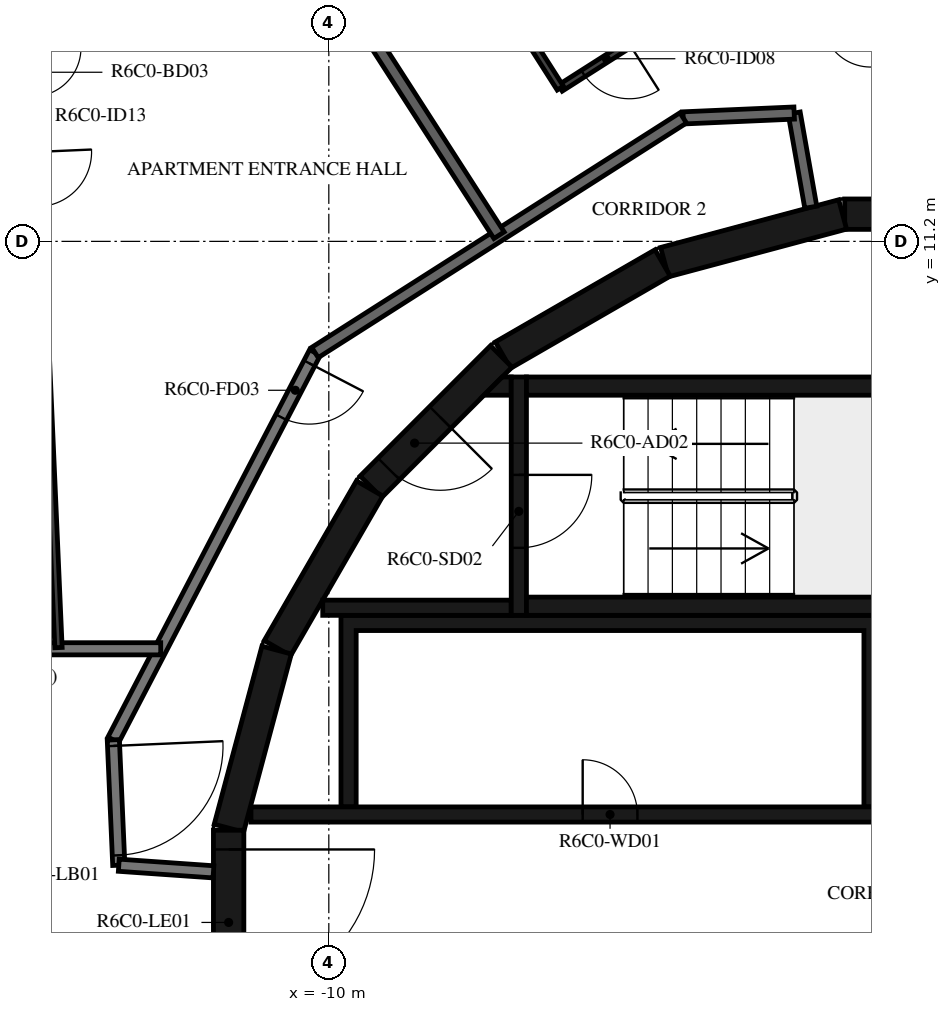
"""IFC4 building model, lengths in metres.
Left out: names, types, materials, properties, quantities, classifications, styles, units other than length and angle.
Written with IfcOpenShell. Run it as: python <this file> out.ifc"""

import sys

from ifc_helpers import new_model, si_unit, direction, frame, frame_2d, origin, place, context, subcontext, project, spatial, polyline, rectangle, outline, extrude, element, fill, save


model = new_model("IFC4")
c1 = context("Model", 3, precision=1e-05, world=origin(), true_north=direction((0.0, 1.0)))
c2 = subcontext(c1, "Body", "Model", "MODEL_VIEW")
j1 = project(units=[si_unit("LENGTHUNIT", "METRE"), si_unit("PLANEANGLEUNIT", "RADIAN")], contexts=[c1])
p1 = place(None, origin())
s1 = spatial("IfcSite", under=j1, at=p1, CompositionType="ELEMENT")
p2 = place(p1, origin())
s2 = spatial("IfcBuilding", under=s1, at=p2, CompositionType="ELEMENT")
p3 = place(p2, frame((0.0, 0.0, 247.7)))
s3 = spatial("IfcBuildingStorey", under=s2, at=p3, CompositionType="ELEMENT", Elevation=247.7)
for number, where, z_axis, x_axis in (
    (1, (1.516, 11.647, 0.0), (0.0, 0.0, 1.0), (-1.0, 0.0, 0.0)),
    (2, (-1.55, 11.643, 0.0), (0.0, 0.0, 1.0), (-0.966, -0.259, 0.0)),
    (3, (-4.51, 10.845, 0.0), (0.0, 0.0, 1.0), (-0.866, -0.5, 0.0)),
):
    element("IfcWall", number, at=place(p3, frame(where, z_axis=z_axis, x_axis=x_axis)), inside=s3, PredefinedType="SHEAR", context=c2, shape_type="SweptSolid", body=[
        extrude(rectangle(XDim=3.033, YDim=0.5, at=frame_2d((1.516, 0.0))), origin(), (0.0, 0.0, 1.0), 3.12),
    ])
p4 = place(p3, frame((-7.164, 9.308, 0.0), z_axis=(0.0, 0.0, 1.0), x_axis=(-0.707106781187, -0.707106781187, 0.0)))
e4 = element("IfcWall", 4, at=p4, inside=s3, PredefinedType="SHEAR", context=c2, shape_type="SweptSolid", body=[
    extrude(rectangle(XDim=3.032, YDim=0.5, at=frame_2d((1.516, 0.0))), origin(), (0.0, 0.0, 1.0), 3.12),
])
p5 = place(p4, frame((1.416, 0.0, 0.0)))
e5 = element("IfcOpeningElement", 5, at=p5, cuts=e4, PredefinedType="OPENING", context=c2, shape_type="SweptSolid", body=[
    extrude(rectangle(XDim=1.2, YDim=2.1, at=frame_2d((0.6, 1.05))), frame((0.0, 0.26, 0.0), z_axis=(0.0, -1.0, 0.0), x_axis=(1.0, 0.0, 0.0)), (0.0, 0.0, 1.0), 0.52),
])
for number, where, z_axis, x_axis in (
    (6, (-9.329, 7.137, 0.0), (0.0, 0.0, 1.0), (-0.5, -0.866, 0.0)),
    (7, (-10.858, 4.479, 0.0), (0.0, 0.0, 1.0), (-0.259, -0.966, 0.0)),
):
    element("IfcWall", number, at=place(p3, frame(where, z_axis=z_axis, x_axis=x_axis)), inside=s3, PredefinedType="SHEAR", context=c2, shape_type="SweptSolid", body=[
        extrude(rectangle(XDim=3.033, YDim=0.5, at=frame_2d((1.516, 0.0))), origin(), (0.0, 0.0, 1.0), 3.12),
    ])
p6 = place(p3, frame((-11.647, 1.516, 0.0), z_axis=(0.0, 0.0, 1.0), x_axis=(0.0, -1.0, 0.0)))
e8 = element("IfcWall", 8, at=p6, inside=s3, PredefinedType="SHEAR", context=c2, shape_type="SweptSolid", body=[
    extrude(rectangle(XDim=3.033, YDim=0.5, at=frame_2d((1.516, 0.0))), origin(), (0.0, 0.0, 1.0), 3.12),
])
p7 = place(p6, frame((0.316, 0.0, 0.0)))
e9 = element("IfcOpeningElement", 9, at=p7, cuts=e8, PredefinedType="OPENING", context=c2, shape_type="SweptSolid", body=[
    extrude(rectangle(XDim=2.4, YDim=2.1, at=frame_2d((1.2, 1.05))), frame((0.0, 0.26, 0.0), z_axis=(0.0, -1.0, 0.0), x_axis=(1.0, 0.0, 0.0)), (0.0, 0.0, 1.0), 0.52),
])
for number, where, z_axis, x_axis in (
    (10, (-6.75, 5.2, 0.0), (0.0, 0.0, 1.0), (1.0, 0.0, 0.0)),
    (11, (-6.75, 8.82, 0.0), (0.0, 0.0, 1.0), (1.0, 0.0, 0.0)),
):
    element("IfcWall", number, at=place(p3, frame(where, z_axis=z_axis, x_axis=x_axis)), inside=s3, PredefinedType="SHEAR", context=c2, shape_type="SweptSolid", body=[
        extrude(rectangle(XDim=6.75, YDim=0.3, at=frame_2d((3.375, 0.0))), origin(), (0.0, 0.0, 1.0), 3.12),
    ])
p8 = place(p3, frame((-6.875, 8.97, 0.0), z_axis=(0.0, 0.0, 1.0), x_axis=(0.0, -1.0, 0.0)))
e12 = element("IfcWall", 12, at=p8, inside=s3, PredefinedType="SHEAR", context=c2, shape_type="SweptSolid", body=[
    extrude(rectangle(XDim=3.92, YDim=0.25, at=frame_2d((1.96, 0.0))), origin(), (0.0, 0.0, 1.0), 3.12),
])
p9 = place(p8, frame((1.61, 0.0, 0.0)))
e13 = element("IfcOpeningElement", 13, at=p9, cuts=e12, PredefinedType="OPENING", context=c2, shape_type="SweptSolid", body=[
    extrude(rectangle(XDim=1.2, YDim=2.1, at=frame_2d((0.6, 1.05))), frame((0.0, 0.135, 0.0), z_axis=(0.0, -1.0, 0.0), x_axis=(1.0, 0.0, 0.0)), (0.0, 0.0, 1.0), 0.27),
])
p10 = place(p3, frame((-7.0, 5.175, 0.0), z_axis=(0.0, 0.0, 1.0), x_axis=(-1.0, 0.0, 0.0)))
e14 = element("IfcWall", 14, at=p10, inside=s3, PredefinedType="SHEAR", context=c2, shape_type="SweptSolid", body=[
    extrude(rectangle(XDim=3.1, YDim=0.25, at=frame_2d((1.55, 0.0))), origin(), (0.0, 0.0, 1.0), 3.12),
])
p11 = place(p3, origin())
e15 = element("IfcWall", 15, at=p11, inside=s3, PredefinedType="SHEAR", context=c2, shape_type="SweptSolid", body=[
    extrude(outline(polyline([(-7.148, 8.97), (-7.0, 8.97), (-7.0, 8.67), (-7.448, 8.67), (-7.148, 8.97)])), origin(), (0.0, 0.0, 1.0), 3.12),
])
p12 = place(p3, origin())
e16 = element("IfcWall", 16, at=p12, inside=s3, PredefinedType="SHEAR", context=c2, shape_type="SweptSolid", body=[
    extrude(outline(polyline([(-9.55, 4.8), (-1.2, 4.8), (-1.2, 1.9), (-0.95, 1.9), (-0.95, 4.8), (0.95, 4.8), (0.95, 1.9), (1.2, 1.9), (1.2, 4.8), (3.1, 4.8), (3.1, 1.9), (3.35, 1.9), (3.35, 4.8), (5.25, 4.8), (5.25, 1.9), (5.5, 1.9), (5.5, 4.8), (7.4, 4.8), (7.4, 1.9), (7.65, 1.9), (7.65, 4.8), (9.55, 4.8), (9.55, 1.9), (9.8, 1.9), (9.8, 4.8), (9.8, 5.05), (-9.8, 5.05), (-9.8, 4.8), (-9.8, 1.9), (-9.55, 1.9), (-9.55, 4.8)])), origin(), (0.0, 0.0, 1.0), 3.12),
])
p13 = place(p3, frame((-11.28, 1.775, 0.0), z_axis=(0.0, 0.0, 1.0), x_axis=(1.0, 0.0, 0.0)))
e17 = element("IfcWall", 17, at=p13, inside=s3, PredefinedType="SHEAR", context=c2, shape_type="SweptSolid", body=[
    extrude(rectangle(XDim=14.38, YDim=0.25, at=frame_2d((7.19, 0.0))), origin(), (0.0, 0.0, 1.0), 3.12),
])
p14 = place(p13, frame((10.73, 0.0, 0.0)))
e18 = element("IfcOpeningElement", 18, at=p14, cuts=e17, PredefinedType="OPENING", context=c2, shape_type="SweptSolid", body=[
    extrude(rectangle(XDim=1.1, YDim=2.1, at=frame_2d((0.55, 1.05))), frame((0.0, 0.135, 0.0), z_axis=(0.0, -1.0, 0.0), x_axis=(1.0, 0.0, 0.0)), (0.0, 0.0, 1.0), 0.27),
])
p15 = place(p13, frame((12.88, 0.0, 0.0)))
e19 = element("IfcOpeningElement", 19, at=p15, cuts=e17, PredefinedType="OPENING", context=c2, shape_type="SweptSolid", body=[
    extrude(rectangle(XDim=1.1, YDim=2.1, at=frame_2d((0.55, 1.05))), frame((0.0, 0.135, 0.0), z_axis=(0.0, -1.0, 0.0), x_axis=(1.0, 0.0, 0.0)), (0.0, 0.0, 1.0), 0.27),
])
p16 = place(p13, frame((5.455, 0.0, 0.0)))
e20 = element("IfcOpeningElement", 20, at=p16, cuts=e17, PredefinedType="OPENING", context=c2, shape_type="SweptSolid", body=[
    extrude(rectangle(XDim=0.9, YDim=2.1, at=frame_2d((0.45, 1.05))), frame((0.0, 0.135, 0.0), z_axis=(0.0, -1.0, 0.0), x_axis=(1.0, 0.0, 0.0)), (0.0, 0.0, 1.0), 0.27),
])
p17 = place(p3, frame((-10.228, 9.372, 0.0), z_axis=(0.0, 0.0, 1.0), x_axis=(-0.461759464021, -0.887005184532, 0.0)))
e21 = element("IfcWall", 21, at=p17, inside=s3, PredefinedType="STANDARD", context=c2, shape_type="SweptSolid", body=[
    extrude(rectangle(XDim=7.181, YDim=0.2, at=frame_2d((3.591, 0.0))), origin(), (0.0, 0.0, 1.0), 3.12),
])
p18 = place(p17, frame((0.2, 0.0, 0.0)))
e22 = element("IfcOpeningElement", 22, at=p18, cuts=e21, PredefinedType="OPENING", context=c2, shape_type="SweptSolid", body=[
    extrude(rectangle(XDim=1.0, YDim=2.1, at=frame_2d((0.5, 1.05))), frame((0.0, 0.11, 0.0), z_axis=(0.0, -1.0, 0.0), x_axis=(1.0, 0.0, 0.0)), (0.0, 0.0, 1.0), 0.22),
])
p19 = place(p3, frame((-13.544, 3.003, 0.0), z_axis=(0.0, 0.0, 1.0), x_axis=(0.043652842459, -0.99904676034, 0.0)))
e23 = element("IfcWall", 23, at=p19, inside=s3, PredefinedType="STANDARD", context=c2, shape_type="SweptSolid", body=[
    extrude(rectangle(XDim=2.064, YDim=0.2, at=frame_2d((1.032, 0.0))), origin(), (0.0, 0.0, 1.0), 3.12),
])
p20 = place(p19, frame((0.1, 0.0, 0.0)))
e24 = element("IfcOpeningElement", 24, at=p20, cuts=e23, PredefinedType="OPENING", context=c2, shape_type="SweptSolid", body=[
    extrude(rectangle(XDim=1.8, YDim=2.1, at=frame_2d((0.9, 1.05))), frame((0.0, 0.11, 0.0), z_axis=(0.0, -1.0, 0.0), x_axis=(1.0, 0.0, 0.0)), (0.0, 0.0, 1.0), 0.22),
])
p21 = place(p3, frame((-13.454, 0.941, 0.0), z_axis=(0.0, 0.0, 1.0), x_axis=(0.99755155062, -0.069934997354, 0.0)))
e25 = element("IfcWall", 25, at=p21, inside=s3, PredefinedType="STANDARD", context=c2, shape_type="SweptSolid", body=[
    extrude(rectangle(XDim=1.561, YDim=0.2, at=frame_2d((0.78, 0.0))), origin(), (0.0, 0.0, 1.0), 3.12),
])
p22 = place(p3, frame((-2.074, 11.761, 0.0), z_axis=(0.0, 0.0, 1.0), x_axis=(-0.173679082312, 0.984802303189, 0.0)))
e26 = element("IfcWall", 26, at=p22, inside=s3, PredefinedType="STANDARD", context=c2, shape_type="SweptSolid", body=[
    extrude(rectangle(XDim=1.573, YDim=0.2, at=frame_2d((0.787, 0.0))), origin(), (0.0, 0.0, 1.0), 3.12),
])
p23 = place(p3, frame((-2.347, 13.31, 0.0), z_axis=(0.0, 0.0, 1.0), x_axis=(-0.999050095671, -0.043576442492, 0.0)))
e27 = element("IfcWall", 27, at=p23, inside=s3, PredefinedType="STANDARD", context=c2, shape_type="SweptSolid", body=[
    extrude(rectangle(XDim=1.826, YDim=0.2, at=frame_2d((0.913, 0.0))), origin(), (0.0, 0.0, 1.0), 3.12),
])
p24 = place(p3, frame((-4.172, 13.231, 0.0), z_axis=(0.0, 0.0, 1.0), x_axis=(-0.843388394728, -0.537304397561, 0.0)))
e28 = element("IfcWall", 28, at=p24, inside=s3, PredefinedType="STANDARD", context=c2, shape_type="SweptSolid", body=[
    extrude(rectangle(XDim=7.181, YDim=0.2, at=frame_2d((3.59, 0.0))), origin(), (0.0, 0.0, 1.0), 3.12),
])
p25 = place(p3, frame((-12.764, 4.5, 0.0), z_axis=(0.0, 0.0, 1.0), x_axis=(-1.0, 0.0, 0.0)))
e29 = element("IfcWall", 29, at=p25, inside=s3, PredefinedType="STANDARD", context=c2, shape_type="SweptSolid", body=[
    extrude(rectangle(XDim=5.135, YDim=0.2, at=frame_2d((2.568, 0.0))), origin(), (0.0, 0.0, 1.0), 3.12),
])
p26 = place(p3, frame((-9.69, 15.171, 0.0), z_axis=(0.0, 0.0, 1.0), x_axis=(0.540961372678, -0.841047438181, 0.0)))
e30 = element("IfcWall", 30, at=p26, inside=s3, PredefinedType="STANDARD", context=c2, shape_type="SweptSolid", body=[
    extrude(rectangle(XDim=4.602, YDim=0.2, at=frame_2d((2.301, 0.0))), origin(), (0.0, 0.0, 1.0), 3.12),
])
p27 = place(p3, frame((-4.888, 14.553, 0.0), z_axis=(0.0, 0.0, 1.0), x_axis=(-0.843349608892, -0.537365273517, 0.0)))
e31 = element("IfcWall", 31, at=p27, inside=s3, PredefinedType="PARTITIONING", context=c2, shape_type="SweptSolid", body=[
    extrude(rectangle(XDim=1.548, YDim=0.12, at=frame_2d((0.774, 0.0))), origin(), (0.0, 0.0, 1.0), 3.12),
])
p28 = place(p27, frame((0.2, 0.0, 0.0)))
e32 = element("IfcOpeningElement", 32, at=p28, cuts=e31, PredefinedType="OPENING", context=c2, shape_type="SweptSolid", body=[
    extrude(rectangle(XDim=0.9, YDim=2.1, at=frame_2d((0.45, 1.05))), frame((0.0, 0.07, 0.0), z_axis=(0.0, -1.0, 0.0), x_axis=(1.0, 0.0, 0.0)), (0.0, 0.0, 1.0), 0.14),
])
p29 = place(p3, frame((-6.194, 13.721, 0.0), z_axis=(0.0, 0.0, 1.0), x_axis=(-0.537316807294, 0.843380488629, 0.0)))
e33 = element("IfcWall", 33, at=p29, inside=s3, PredefinedType="PARTITIONING", context=c2, shape_type="SweptSolid", body=[
    extrude(rectangle(XDim=4.331, YDim=0.12, at=frame_2d((2.165, 0.0))), origin(), (0.0, 0.0, 1.0), 3.12),
])
p30 = place(p3, frame((-14.955, 16.187, 0.0), z_axis=(0.0, 0.0, 1.0), x_axis=(0.04360777668, -0.999048728448, 0.0)))
e34 = element("IfcWall", 34, at=p30, inside=s3, PredefinedType="PARTITIONING", context=c2, shape_type="SweptSolid", body=[
    extrude(rectangle(XDim=11.679, YDim=0.12, at=frame_2d((5.839, 0.0))), origin(), (0.0, 0.0, 1.0), 3.12),
])
p31 = place(p30, frame((1.808, 0.0, 0.0)))
e35 = element("IfcOpeningElement", 35, at=p31, cuts=e34, PredefinedType="OPENING", context=c2, shape_type="SweptSolid", body=[
    extrude(rectangle(XDim=0.8, YDim=2.1, at=frame_2d((0.4, 1.05))), frame((0.0, 0.07, 0.0), z_axis=(0.0, -1.0, 0.0), x_axis=(1.0, 0.0, 0.0)), (0.0, 0.0, 1.0), 0.14),
])
p32 = place(p30, frame((3.519, 0.0, 0.0)))
e36 = element("IfcOpeningElement", 36, at=p32, cuts=e34, PredefinedType="OPENING", context=c2, shape_type="SweptSolid", body=[
    extrude(rectangle(XDim=0.9, YDim=2.1, at=frame_2d((0.45, 1.05))), frame((0.0, 0.07, 0.0), z_axis=(0.0, -1.0, 0.0), x_axis=(1.0, 0.0, 0.0)), (0.0, 0.0, 1.0), 0.14),
])
p33 = place(p9, origin())
e37 = element("IfcDoor", 37, at=p33, inside=s3, OperationType="SINGLE_SWING_LEFT", PredefinedType="DOOR", context=c2, shape_type="SweptSolid", body=[
    extrude(rectangle(XDim=1.2, YDim=2.1, at=frame_2d((0.6, 1.05))), frame((0.0, 0.025, 0.0), z_axis=(0.0, -1.0, 0.0), x_axis=(1.0, 0.0, 0.0)), (0.0, 0.0, 1.0), 0.05),
])
fill(e13, e37)
p34 = place(p5, origin())
e38 = element("IfcDoor", 38, at=p34, inside=s3, OperationType="SINGLE_SWING_RIGHT", PredefinedType="DOOR", context=c2, shape_type="SweptSolid", body=[
    extrude(rectangle(XDim=1.2, YDim=2.1, at=frame_2d((0.6, 1.05))), frame((0.0, 0.025, 0.0), z_axis=(0.0, -1.0, 0.0), x_axis=(1.0, 0.0, 0.0)), (0.0, 0.0, 1.0), 0.05),
])
fill(e5, e38)
p35 = place(p7, origin())
e39 = element("IfcDoor", 39, at=p35, inside=s3, OperationType="DOUBLE_DOOR_SINGLE_SWING", PredefinedType="DOOR", context=c2, shape_type="SweptSolid", body=[
    extrude(rectangle(XDim=2.4, YDim=2.1, at=frame_2d((1.2, 1.05))), frame((0.0, 0.025, 0.0), z_axis=(0.0, -1.0, 0.0), x_axis=(1.0, 0.0, 0.0)), (0.0, 0.0, 1.0), 0.05),
])
fill(e9, e39)
p36 = place(p16, origin())
e40 = element("IfcDoor", 40, at=p36, inside=s3, OperationType="SINGLE_SWING_LEFT", PredefinedType="DOOR", context=c2, shape_type="SweptSolid", body=[
    extrude(rectangle(XDim=0.9, YDim=2.1, at=frame_2d((0.45, 1.05))), frame((0.0, 0.025, 0.0), z_axis=(0.0, -1.0, 0.0), x_axis=(1.0, 0.0, 0.0)), (0.0, 0.0, 1.0), 0.05),
])
fill(e20, e40)
p37 = place(p28, origin())
e41 = element("IfcDoor", 41, at=p37, inside=s3, OperationType="SINGLE_SWING_RIGHT", PredefinedType="DOOR", context=c2, shape_type="SweptSolid", body=[
    extrude(rectangle(XDim=0.9, YDim=2.1, at=frame_2d((0.45, 1.05))), frame((0.0, 0.025, 0.0), z_axis=(0.0, -1.0, 0.0), x_axis=(1.0, 0.0, 0.0)), (0.0, 0.0, 1.0), 0.05),
])
fill(e32, e41)
p38 = place(p18, origin())
e42 = element("IfcDoor", 42, at=p38, inside=s3, OperationType="SINGLE_SWING_LEFT", PredefinedType="DOOR", context=c2, shape_type="SweptSolid", body=[
    extrude(rectangle(XDim=1.0, YDim=2.1, at=frame_2d((0.5, 1.05))), frame((0.0, 0.025, 0.0), z_axis=(0.0, -1.0, 0.0), x_axis=(1.0, 0.0, 0.0)), (0.0, 0.0, 1.0), 0.05),
])
fill(e22, e42)
p39 = place(p20, origin())
e43 = element("IfcDoor", 43, at=p39, inside=s3, OperationType="DOUBLE_DOOR_SINGLE_SWING", PredefinedType="DOOR", context=c2, shape_type="SweptSolid", body=[
    extrude(rectangle(XDim=1.8, YDim=2.1, at=frame_2d((0.9, 1.05))), frame((0.0, 0.025, 0.0), z_axis=(0.0, -1.0, 0.0), x_axis=(1.0, 0.0, 0.0)), (0.0, 0.0, 1.0), 0.05),
])
fill(e24, e43)
save(model, sys.argv[1])
